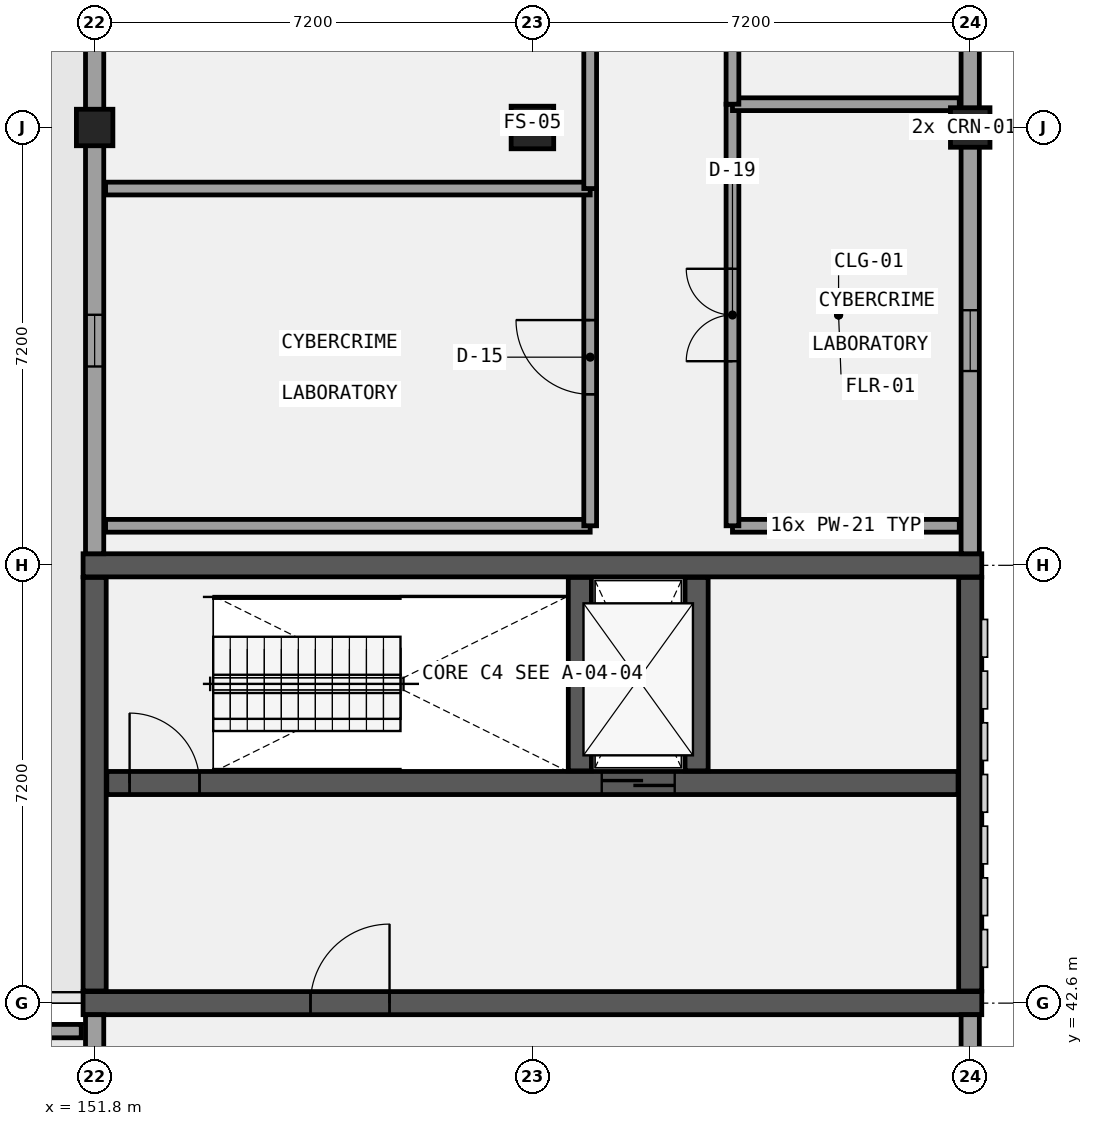
"""IFC4 building model, lengths in metres.
Left out: names, types, materials, properties, quantities, classifications, styles, units other than length and angle.
Written with IfcOpenShell. Run it as: python <this file> out.ifc"""

import sys

from ifc_helpers import new_model, si_unit, direction, frame, frame_2d, origin, origin_2d, place, context, subcontext, project, spatial, rectangle, extrude, element, fill, save


model = new_model("IFC4")
c1 = context("Model", 3, precision=1e-05, world=origin(), true_north=direction((0.0, 1.0)))
c2 = subcontext(c1, "Body", "Model", "MODEL_VIEW")
j1 = project(units=[si_unit("LENGTHUNIT", "METRE"), si_unit("PLANEANGLEUNIT", "RADIAN")], contexts=[c1])
p1 = place(None, origin())
s1 = spatial("IfcSite", under=j1, at=p1, CompositionType="ELEMENT")
p2 = place(p1, origin())
s2 = spatial("IfcBuilding", under=s1, at=p2, CompositionType="ELEMENT")
p3 = place(p2, frame((0.0, 0.0, 13.8)))
s3 = spatial("IfcBuildingStorey", under=s2, at=p3, CompositionType="ELEMENT", Elevation=13.8)
p4 = place(p3, frame((151.61, 49.8, 0.0), z_axis=(0.0, 0.0, 1.0), x_axis=(1.0, 0.0, 0.0)))
e1 = element("IfcWall", 1, at=p4, inside=s3, PredefinedType="SHEAR", context=c2, shape_type="SweptSolid", body=[
    extrude(rectangle(XDim=14.78, YDim=0.38, at=frame_2d((7.39, 0.0))), origin(), (0.0, 0.0, 1.0), 4.2),
])
p5 = place(p3, frame((151.61, 42.6, 0.0), z_axis=(0.0, 0.0, 1.0), x_axis=(1.0, 0.0, 0.0)))
e2 = element("IfcWall", 2, at=p5, inside=s3, PredefinedType="SHEAR", context=c2, shape_type="SweptSolid", body=[
    extrude(rectangle(XDim=14.78, YDim=0.38, at=frame_2d((7.39, 0.0))), origin(), (0.0, 0.0, 1.0), 4.2),
])
p6 = place(p5, frame((3.74, 0.0, 0.0)))
e3 = element("IfcOpeningElement", 3, at=p6, cuts=e2, PredefinedType="OPENING", context=c2, shape_type="SweptSolid", body=[
    extrude(rectangle(XDim=1.3, YDim=2.2, at=frame_2d((0.65, 1.1))), frame((0.0, 0.2, 0.0), z_axis=(0.0, -1.0, 0.0), x_axis=(1.0, 0.0, 0.0)), (0.0, 0.0, 1.0), 0.4),
])
for number, where, z_axis, x_axis in (
    (4, (151.8, 42.8, 0.0), (0.0, 0.0, 1.0), (0.0, 1.0, 0.0)),
    (5, (166.2, 42.8, 0.0), (0.0, 0.0, 1.0), (0.0, 1.0, 0.0)),
):
    element("IfcWall", number, at=place(p3, frame(where, z_axis=z_axis, x_axis=x_axis)), inside=s3, PredefinedType="SHEAR", context=c2, shape_type="SweptSolid", body=[
        extrude(rectangle(XDim=6.8, YDim=0.38, at=frame_2d((3.4, 0.0))), origin(), (0.0, 0.0, 1.0), 4.2),
    ])
p7 = place(p3, frame((152.0, 46.22, 0.0), z_axis=(0.0, 0.0, 1.0), x_axis=(1.0, 0.0, 0.0)))
e6 = element("IfcWall", 6, at=p7, inside=s3, PredefinedType="SHEAR", context=c2, shape_type="SweptSolid", body=[
    extrude(rectangle(XDim=14.0, YDim=0.38, at=frame_2d((7.0, 0.0))), origin(), (0.0, 0.0, 1.0), 4.2),
])
p8 = place(p7, frame((8.14, 0.0, 0.0)))
e7 = element("IfcOpeningElement", 7, at=p8, cuts=e6, PredefinedType="OPENING", context=c2, shape_type="SweptSolid", body=[
    extrude(rectangle(XDim=1.2, YDim=2.15, at=frame_2d((0.6, 1.075))), frame((0.0, 0.2, 0.0), z_axis=(0.0, -1.0, 0.0), x_axis=(1.0, 0.0, 0.0)), (0.0, 0.0, 1.0), 0.4),
])
p9 = place(p7, frame((0.375, 0.0, 0.0)))
e8 = element("IfcOpeningElement", 8, at=p9, cuts=e6, PredefinedType="OPENING", context=c2, shape_type="SweptSolid", body=[
    extrude(rectangle(XDim=1.15, YDim=2.15, at=frame_2d((0.575, 1.075))), frame((0.0, 0.2, 0.0), z_axis=(0.0, -1.0, 0.0), x_axis=(1.0, 0.0, 0.0)), (0.0, 0.0, 1.0), 0.4),
])
for number, where, z_axis, x_axis in (
    (9, (159.78, 46.42, 0.0), (0.0, 0.0, 1.0), (0.0, 1.0, 0.0)),
    (10, (161.7, 46.42, 0.0), (0.0, 0.0, 1.0), (0.0, 1.0, 0.0)),
):
    element("IfcWall", number, at=place(p3, frame(where, z_axis=z_axis, x_axis=x_axis)), inside=s3, PredefinedType="SHEAR", context=c2, shape_type="SweptSolid", body=[
        extrude(rectangle(XDim=3.18, YDim=0.38, at=frame_2d((1.59, 0.0))), origin(), (0.0, 0.0, 1.0), 4.2),
    ])
p10 = place(p3, frame((151.8, 57.0, 0.0), z_axis=(0.0, 0.0, 1.0), x_axis=(1.0, 0.0, 0.0)))
e11 = element("IfcColumn", 11, at=p10, inside=s3, PredefinedType="COLUMN", context=c2, shape_type="SweptSolid", body=[
    extrude(rectangle(XDim=0.6, YDim=0.6, at=origin_2d()), origin(), (0.0, 0.0, 1.0), 4.2),
])
p11 = place(p3, frame((159.0, 57.0, 0.0), z_axis=(0.0, 0.0, 1.0), x_axis=(1.0, 0.0, 0.0)))
e12 = element("IfcColumn", 12, at=p11, inside=s3, PredefinedType="COLUMN", context=c2, shape_type="SweptSolid", body=[
    extrude(rectangle(XDim=0.7, YDim=0.7, at=origin_2d()), origin(), (0.0, 0.0, 1.0), 4.2),
])
p12 = place(p3, frame((166.2, 57.0, 0.0), z_axis=(0.0, 0.0, 1.0), x_axis=(1.0, 0.0, 0.0)))
e13 = element("IfcColumn", 13, at=p12, inside=s3, PredefinedType="COLUMN", context=c2, shape_type="SweptSolid", body=[
    extrude(rectangle(XDim=0.65, YDim=0.65, at=origin_2d()), origin(), (0.0, 0.0, 1.0), 4.2),
])
p13 = place(p3, frame((151.8, 78.45, 0.0), z_axis=(0.0, 0.0, 1.0), x_axis=(0.0, -1.0, 0.0)))
e14 = element("IfcWall", 14, at=p13, inside=s3, PredefinedType="SOLIDWALL", context=c2, shape_type="SweptSolid", body=[
    extrude(rectangle(XDim=28.46, YDim=0.3, at=frame_2d((14.23, 0.0))), origin(), (0.0, 0.0, 1.0), 3.19),
])
p14 = place(p13, frame((17.08, 0.0, 0.0)))
e15 = element("IfcOpeningElement", 15, at=p14, cuts=e14, PredefinedType="OPENING", context=c2, shape_type="SweptSolid", body=[
    extrude(rectangle(XDim=1.1, YDim=2.2, at=frame_2d((0.55, 1.1))), frame((0.0, 0.16, 0.0), z_axis=(0.0, -1.0, 0.0), x_axis=(1.0, 0.0, 0.0)), (0.0, 0.0, 1.0), 0.32),
])
p15 = place(p13, frame((24.53, 0.0, 1.0)))
e16 = element("IfcOpeningElement", 16, at=p15, cuts=e14, PredefinedType="OPENING", context=c2, shape_type="SweptSolid", body=[
    extrude(rectangle(XDim=0.85, YDim=1.65, at=frame_2d((0.425, 0.825))), frame((0.0, 0.16, 0.0), z_axis=(0.0, -1.0, 0.0), x_axis=(1.0, 0.0, 0.0)), (0.0, 0.0, 1.0), 0.32),
])
p16 = place(p13, frame((10.225, 0.0, 1.0)))
e17 = element("IfcOpeningElement", 17, at=p16, cuts=e14, PredefinedType="OPENING", context=c2, shape_type="SweptSolid", body=[
    extrude(rectangle(XDim=0.85, YDim=1.65, at=frame_2d((0.425, 0.825))), frame((0.0, 0.16, 0.0), z_axis=(0.0, -1.0, 0.0), x_axis=(1.0, 0.0, 0.0)), (0.0, 0.0, 1.0), 0.32),
])
p17 = place(p13, frame((3.1, 0.0, 1.0)))
e18 = element("IfcOpeningElement", 18, at=p17, cuts=e14, PredefinedType="OPENING", context=c2, shape_type="SweptSolid", body=[
    extrude(rectangle(XDim=0.85, YDim=1.65, at=frame_2d((0.425, 0.825))), frame((0.0, 0.16, 0.0), z_axis=(0.0, -1.0, 0.0), x_axis=(1.0, 0.0, 0.0)), (0.0, 0.0, 1.0), 0.32),
])
p18 = place(p3, frame((151.8, 42.41, 0.0), z_axis=(0.0, 0.0, 1.0), x_axis=(0.0, -1.0, 0.0)))
e19 = element("IfcWall", 19, at=p18, inside=s3, PredefinedType="SOLIDWALL", context=c2, shape_type="SweptSolid", body=[
    extrude(rectangle(XDim=6.86, YDim=0.3, at=frame_2d((3.43, 0.0))), origin(), (0.0, 0.0, 1.0), 3.04),
])
p19 = place(p18, frame((2.63, 0.0, 1.0)))
e20 = element("IfcOpeningElement", 20, at=p19, cuts=e19, PredefinedType="OPENING", context=c2, shape_type="SweptSolid", body=[
    extrude(rectangle(XDim=1.6, YDim=1.4, at=frame_2d((0.8, 0.7))), frame((0.0, 0.16, 0.0), z_axis=(0.0, -1.0, 0.0), x_axis=(1.0, 0.0, 0.0)), (0.0, 0.0, 1.0), 0.32),
])
p20 = place(p3, frame((166.2, 35.55, 0.0), z_axis=(0.0, 0.0, 1.0), x_axis=(0.0, 1.0, 0.0)))
e21 = element("IfcWall", 21, at=p20, inside=s3, PredefinedType="SOLIDWALL", context=c2, shape_type="SweptSolid", body=[
    extrude(rectangle(XDim=6.86, YDim=0.3, at=frame_2d((3.43, 0.0))), origin(), (0.0, 0.0, 1.0), 3.39),
])
p21 = place(p20, frame((2.43, 0.0, 1.0)))
e22 = element("IfcOpeningElement", 22, at=p21, cuts=e21, PredefinedType="OPENING", context=c2, shape_type="SweptSolid", body=[
    extrude(rectangle(XDim=2.0, YDim=1.9, at=frame_2d((1.0, 0.95))), frame((0.0, 0.16, 0.0), z_axis=(0.0, -1.0, 0.0), x_axis=(1.0, 0.0, 0.0)), (0.0, 0.0, 1.0), 0.32),
])
p22 = place(p3, frame((166.2, 49.99, 0.0), z_axis=(0.0, 0.0, 1.0), x_axis=(0.0, 1.0, 0.0)))
e23 = element("IfcWall", 23, at=p22, inside=s3, PredefinedType="SOLIDWALL", context=c2, shape_type="SweptSolid", body=[
    extrude(rectangle(XDim=28.46, YDim=0.3, at=frame_2d((14.23, 0.0))), origin(), (0.0, 0.0, 1.0), 3.14),
])
p23 = place(p22, frame((3.005, 0.0, 1.0)))
e24 = element("IfcOpeningElement", 24, at=p23, cuts=e23, PredefinedType="OPENING", context=c2, shape_type="SweptSolid", body=[
    extrude(rectangle(XDim=1.0, YDim=1.4, at=frame_2d((0.5, 0.7))), frame((0.0, 0.16, 0.0), z_axis=(0.0, -1.0, 0.0), x_axis=(1.0, 0.0, 0.0)), (0.0, 0.0, 1.0), 0.32),
])
p24 = place(p22, frame((10.11, 0.0, 1.0)))
e25 = element("IfcOpeningElement", 25, at=p24, cuts=e23, PredefinedType="OPENING", context=c2, shape_type="SweptSolid", body=[
    extrude(rectangle(XDim=1.0, YDim=1.4, at=frame_2d((0.5, 0.7))), frame((0.0, 0.16, 0.0), z_axis=(0.0, -1.0, 0.0), x_axis=(1.0, 0.0, 0.0)), (0.0, 0.0, 1.0), 0.32),
])
p25 = place(p22, frame((17.31, 0.0, 1.0)))
e26 = element("IfcOpeningElement", 26, at=p25, cuts=e23, PredefinedType="OPENING", context=c2, shape_type="SweptSolid", body=[
    extrude(rectangle(XDim=1.0, YDim=1.4, at=frame_2d((0.5, 0.7))), frame((0.0, 0.16, 0.0), z_axis=(0.0, -1.0, 0.0), x_axis=(1.0, 0.0, 0.0)), (0.0, 0.0, 1.0), 0.32),
])
p26 = place(p22, frame((24.435, 0.0, 1.0)))
e27 = element("IfcOpeningElement", 27, at=p26, cuts=e23, PredefinedType="OPENING", context=c2, shape_type="SweptSolid", body=[
    extrude(rectangle(XDim=1.0, YDim=1.4, at=frame_2d((0.5, 0.7))), frame((0.0, 0.16, 0.0), z_axis=(0.0, -1.0, 0.0), x_axis=(1.0, 0.0, 0.0)), (0.0, 0.0, 1.0), 0.32),
])
p27 = place(p3, frame((149.0, 42.14, 0.0), z_axis=(0.0, 0.0, 1.0), x_axis=(1.0, 0.0, 0.0)))
e28 = element("IfcWall", 28, at=p27, inside=s3, PredefinedType="PARAPET", context=c2, shape_type="SweptSolid", body=[
    extrude(rectangle(XDim=2.58, YDim=0.22, at=frame_2d((1.29, 0.0))), origin(), (0.0, 0.0, 1.0), 1.12),
])
p28 = place(p3, frame((151.98, 50.45, 0.0), z_axis=(0.0, 0.0, 1.0), x_axis=(1.0, 0.0, 0.0)))
e29 = element("IfcWall", 29, at=p28, inside=s3, PredefinedType="PARTITIONING", context=c2, shape_type="SweptSolid", body=[
    extrude(rectangle(XDim=7.97, YDim=0.21, at=frame_2d((3.985, 0.0))), origin(), (0.0, 0.0, 1.0), 3.94),
])
p29 = place(p3, frame((159.95, 50.45, 0.0), z_axis=(0.0, 0.0, 1.0), x_axis=(0.0, 1.0, 0.0)))
e30 = element("IfcWall", 30, at=p29, inside=s3, PredefinedType="PARTITIONING", context=c2, shape_type="SweptSolid", body=[
    extrude(rectangle(XDim=5.546, YDim=0.21, at=frame_2d((2.773, 0.0))), origin(), (0.0, 0.0, 1.0), 3.94),
])
p30 = place(p29, frame((2.163, 0.0, 0.0)))
e31 = element("IfcOpeningElement", 31, at=p30, cuts=e30, PredefinedType="OPENING", context=c2, shape_type="SweptSolid", body=[
    extrude(rectangle(XDim=1.22, YDim=2.35, at=frame_2d((0.61, 1.175))), frame((0.0, 0.115, 0.0), z_axis=(0.0, -1.0, 0.0), x_axis=(1.0, 0.0, 0.0)), (0.0, 0.0, 1.0), 0.23),
])
p31 = place(p3, frame((151.98, 55.996, 0.0), z_axis=(0.0, 0.0, 1.0), x_axis=(1.0, 0.0, 0.0)))
e32 = element("IfcWall", 32, at=p31, inside=s3, PredefinedType="PARTITIONING", context=c2, shape_type="SweptSolid", body=[
    extrude(rectangle(XDim=7.97, YDim=0.21, at=frame_2d((3.985, 0.0))), origin(), (0.0, 0.0, 1.0), 3.94),
])
p32 = place(p3, frame((159.95, 55.996, 0.0), z_axis=(0.0, 0.0, 1.0), x_axis=(0.0, 1.0, 0.0)))
e33 = element("IfcWall", 33, at=p32, inside=s3, PredefinedType="PARTITIONING", context=c2, shape_type="SweptSolid", body=[
    extrude(rectangle(XDim=6.996, YDim=0.21, at=frame_2d((3.498, 0.0))), origin(), (0.0, 0.0, 1.0), 3.94),
])
p33 = place(p32, frame((2.818, 0.0, 0.0)))
e34 = element("IfcOpeningElement", 34, at=p33, cuts=e33, PredefinedType="OPENING", context=c2, shape_type="SweptSolid", body=[
    extrude(rectangle(XDim=1.36, YDim=2.1, at=frame_2d((0.68, 1.05))), frame((0.0, 0.115, 0.0), z_axis=(0.0, -1.0, 0.0), x_axis=(1.0, 0.0, 0.0)), (0.0, 0.0, 1.0), 0.23),
])
p34 = place(p3, frame((162.29, 50.45, 0.0), z_axis=(0.0, 0.0, 1.0), x_axis=(1.0, 0.0, 0.0)))
e35 = element("IfcWall", 35, at=p34, inside=s3, PredefinedType="PARTITIONING", context=c2, shape_type="SweptSolid", body=[
    extrude(rectangle(XDim=3.73, YDim=0.21, at=frame_2d((1.865, 0.0))), origin(), (0.0, 0.0, 1.0), 3.94),
])
p35 = place(p3, frame((162.29, 50.45, 0.0), z_axis=(0.0, 0.0, 1.0), x_axis=(0.0, 1.0, 0.0)))
e36 = element("IfcWall", 36, at=p35, inside=s3, PredefinedType="PARTITIONING", context=c2, shape_type="SweptSolid", body=[
    extrude(rectangle(XDim=6.933, YDim=0.21, at=frame_2d((3.467, 0.0))), origin(), (0.0, 0.0, 1.0), 3.94),
])
p36 = place(p35, frame((2.707, 0.0, 0.0)))
e37 = element("IfcOpeningElement", 37, at=p36, cuts=e36, PredefinedType="OPENING", context=c2, shape_type="SweptSolid", body=[
    extrude(rectangle(XDim=1.52, YDim=2.1, at=frame_2d((0.76, 1.05))), frame((0.0, 0.115, 0.0), z_axis=(0.0, -1.0, 0.0), x_axis=(1.0, 0.0, 0.0)), (0.0, 0.0, 1.0), 0.23),
])
p37 = place(p3, frame((162.29, 57.383, 0.0), z_axis=(0.0, 0.0, 1.0), x_axis=(1.0, 0.0, 0.0)))
e38 = element("IfcWall", 38, at=p37, inside=s3, PredefinedType="PARTITIONING", context=c2, shape_type="SweptSolid", body=[
    extrude(rectangle(XDim=3.73, YDim=0.21, at=frame_2d((1.865, 0.0))), origin(), (0.0, 0.0, 1.0), 2.94),
])
p38 = place(p3, frame((162.29, 57.383, 0.0), z_axis=(0.0, 0.0, 1.0), x_axis=(0.0, 1.0, 0.0)))
e39 = element("IfcWall", 39, at=p38, inside=s3, PredefinedType="PARTITIONING", context=c2, shape_type="SweptSolid", body=[
    extrude(rectangle(XDim=6.932, YDim=0.21, at=frame_2d((3.466, 0.0))), origin(), (0.0, 0.0, 1.0), 3.94),
])
p39 = place(p38, frame((2.706, 0.0, 0.0)))
e40 = element("IfcOpeningElement", 40, at=p39, cuts=e39, PredefinedType="OPENING", context=c2, shape_type="SweptSolid", body=[
    extrude(rectangle(XDim=1.52, YDim=2.22, at=frame_2d((0.76, 1.11))), frame((0.0, 0.115, 0.0), z_axis=(0.0, -1.0, 0.0), x_axis=(1.0, 0.0, 0.0)), (0.0, 0.0, 1.0), 0.23),
])
p40 = place(p8, frame((1.2, 0.0, 0.0), z_axis=(0.0, 0.0, 1.0), x_axis=(-1.0, 0.0, 0.0)))
e41 = element("IfcDoor", 41, at=p40, inside=s3, OperationType="DOUBLE_DOOR_SLIDING", PredefinedType="DOOR", context=c2, shape_type="SweptSolid", body=[
    extrude(rectangle(XDim=1.2, YDim=2.15, at=frame_2d((0.6, 1.075))), frame((0.0, 0.025, 0.0), z_axis=(0.0, -1.0, 0.0), x_axis=(1.0, 0.0, 0.0)), (0.0, 0.0, 1.0), 0.05),
])
fill(e7, e41)
p41 = place(p9, origin())
e42 = element("IfcDoor", 42, at=p41, inside=s3, OperationType="SINGLE_SWING_LEFT", PredefinedType="DOOR", context=c2, shape_type="SweptSolid", body=[
    extrude(rectangle(XDim=1.15, YDim=2.15, at=frame_2d((0.575, 1.075))), frame((0.0, 0.025, 0.0), z_axis=(0.0, -1.0, 0.0), x_axis=(1.0, 0.0, 0.0)), (0.0, 0.0, 1.0), 0.05),
])
fill(e8, e42)
p42 = place(p6, frame((1.3, 0.0, 0.0), z_axis=(0.0, 0.0, 1.0), x_axis=(-1.0, 0.0, 0.0)))
e43 = element("IfcDoor", 43, at=p42, inside=s3, OperationType="SINGLE_SWING_RIGHT", PredefinedType="DOOR", context=c2, shape_type="SweptSolid", body=[
    extrude(rectangle(XDim=1.3, YDim=2.2, at=frame_2d((0.65, 1.1))), frame((0.0, 0.025, 0.0), z_axis=(0.0, -1.0, 0.0), x_axis=(1.0, 0.0, 0.0)), (0.0, 0.0, 1.0), 0.05),
])
fill(e3, e43)
p43 = place(p15, origin())
e44 = element("IfcWindow", 44, at=p43, inside=s3, PartitioningType="SINGLE_PANEL", PredefinedType="WINDOW", context=c2, shape_type="SweptSolid", body=[
    extrude(rectangle(XDim=0.85, YDim=1.65, at=frame_2d((0.425, 0.825))), frame((0.0, 0.03, 0.0), z_axis=(0.0, -1.0, 0.0), x_axis=(1.0, 0.0, 0.0)), (0.0, 0.0, 1.0), 0.06),
])
fill(e16, e44)
p44 = place(p23, origin())
e45 = element("IfcWindow", 45, at=p44, inside=s3, PartitioningType="SINGLE_PANEL", PredefinedType="WINDOW", context=c2, shape_type="SweptSolid", body=[
    extrude(rectangle(XDim=1.0, YDim=1.4, at=frame_2d((0.5, 0.7))), frame((0.0, 0.03, 0.0), z_axis=(0.0, -1.0, 0.0), x_axis=(1.0, 0.0, 0.0)), (0.0, 0.0, 1.0), 0.06),
])
fill(e24, e45)
p45 = place(p30, frame((1.22, 0.0, 0.0), z_axis=(0.0, 0.0, 1.0), x_axis=(-1.0, 0.0, 0.0)))
e46 = element("IfcDoor", 46, at=p45, inside=s3, OperationType="SINGLE_SWING_RIGHT", PredefinedType="DOOR", context=c2, shape_type="SweptSolid", body=[
    extrude(rectangle(XDim=1.22, YDim=2.35, at=frame_2d((0.61, 1.175))), frame((0.0, 0.025, 0.0), z_axis=(0.0, -1.0, 0.0), x_axis=(1.0, 0.0, 0.0)), (0.0, 0.0, 1.0), 0.05),
])
fill(e31, e46)
p46 = place(p36, origin())
e47 = element("IfcDoor", 47, at=p46, inside=s3, OperationType="DOUBLE_DOOR_SINGLE_SWING", PredefinedType="DOOR", context=c2, shape_type="SweptSolid", body=[
    extrude(rectangle(XDim=1.52, YDim=2.1, at=frame_2d((0.76, 1.05))), frame((0.0, 0.025, 0.0), z_axis=(0.0, -1.0, 0.0), x_axis=(1.0, 0.0, 0.0)), (0.0, 0.0, 1.0), 0.05),
])
fill(e37, e47)
save(model, sys.argv[1])
